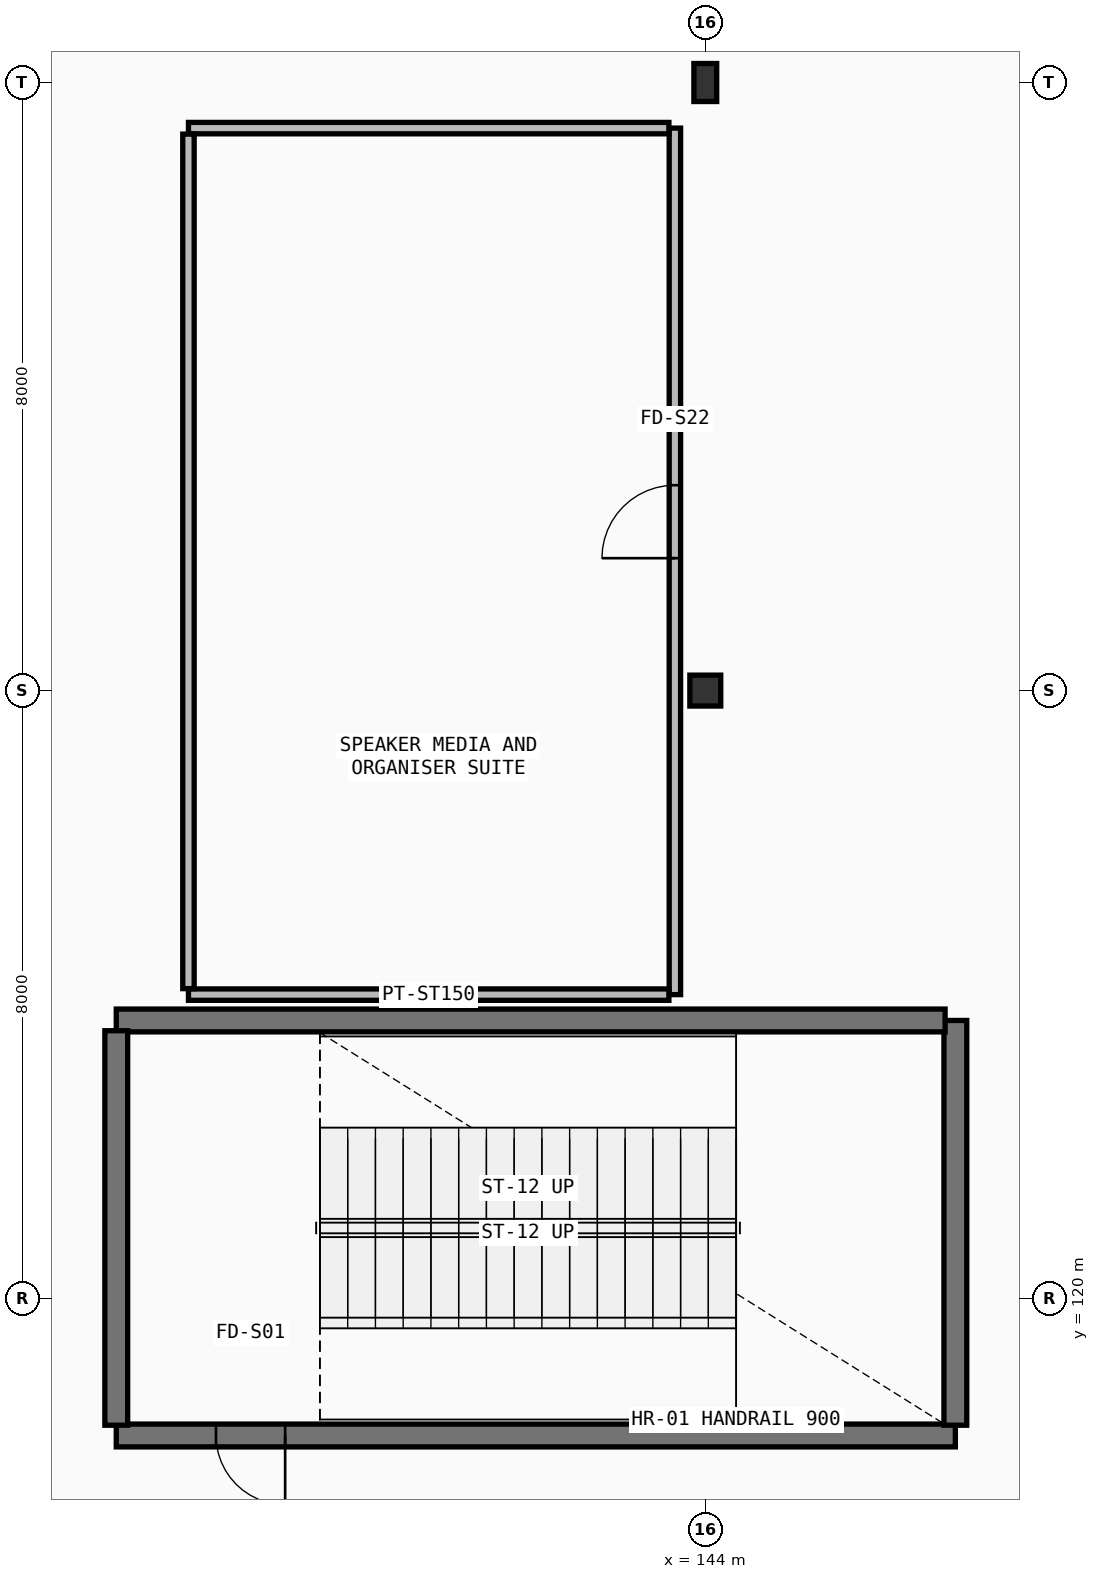
"""IFC4 building model, lengths in metres.
Left out: names, types, materials, properties, quantities, classifications, styles, units other than length and angle.
Written with IfcOpenShell. Run it as: python <this file> out.ifc"""

import sys

from ifc_helpers import new_model, si_unit, direction, frame, frame_2d, origin, origin_2d, place, context, subcontext, project, spatial, rectangle, hollow_circle, i_section, extrude, element, fill, save


model = new_model("IFC4")
c1 = context("Model", 3, precision=1e-05, world=origin(), true_north=direction((0.0, 1.0)))
c2 = subcontext(c1, "Body", "Model", "MODEL_VIEW")
j1 = project(units=[si_unit("LENGTHUNIT", "METRE"), si_unit("PLANEANGLEUNIT", "RADIAN")], contexts=[c1])
p1 = place(None, origin())
s1 = spatial("IfcSite", under=j1, at=p1, CompositionType="ELEMENT")
p2 = place(p1, origin())
s2 = spatial("IfcBuilding", under=s1, at=p2, CompositionType="ELEMENT")
p3 = place(p2, origin())
s3 = spatial("IfcBuildingStorey", under=s2, at=p3, CompositionType="ELEMENT", Elevation=0.0)
p4 = place(p3, frame((144.0, 128.0, -5.4), z_axis=(0.0, 0.0, 1.0), x_axis=(1.0, 0.0, 0.0)))
e1 = element("IfcColumn", 1, at=p4, inside=s3, PredefinedType="COLUMN", context=c2, shape_type="SweptSolid", body=[
    extrude(hollow_circle(Radius=0.203, WallThickness=0.02, at=origin_2d()), origin(), (0.0, 0.0, 1.0), 11.4),
])
p5 = place(p3, frame((144.0, 136.0, -5.4), z_axis=(0.0, 0.0, 1.0), x_axis=(1.0, 0.0, 0.0)))
e2 = element("IfcColumn", 2, at=p5, inside=s3, PredefinedType="COLUMN", context=c2, shape_type="SweptSolid", body=[
    extrude(i_section(OverallWidth=0.3, OverallDepth=0.5, WebThickness=0.014, FlangeThickness=0.028, FilletRadius=0.027, at=origin_2d()), origin(), (0.0, 0.0, 1.0), 11.4),
])
p6 = place(p3, frame((147.29, 118.2, 0.0), z_axis=(0.0, 0.0, 1.0), x_axis=(-1.0, 0.0, 0.0)))
e3 = element("IfcWall", 3, at=p6, inside=s3, PredefinedType="SHEAR", context=c2, shape_type="SweptSolid", body=[
    extrude(rectangle(XDim=11.04, YDim=0.3, at=frame_2d((5.52, 0.0))), origin(), (0.0, 0.0, 1.0), 5.64),
])
p7 = place(p6, frame((8.818, 0.0, 0.0)))
e4 = element("IfcOpeningElement", 4, at=p7, cuts=e3, PredefinedType="OPENING", context=c2, shape_type="SweptSolid", body=[
    extrude(rectangle(XDim=0.91, YDim=2.08, at=frame_2d((0.455, 1.04))), frame((0.0, 0.16, 0.0), z_axis=(0.0, -1.0, 0.0), x_axis=(1.0, 0.0, 0.0)), (0.0, 0.0, 1.0), 0.32),
])
p8 = place(p3, frame((147.29, 123.66, 0.0), z_axis=(0.0, 0.0, 1.0), x_axis=(0.0, -1.0, 0.0)))
e5 = element("IfcWall", 5, at=p8, inside=s3, PredefinedType="SHEAR", context=c2, shape_type="SweptSolid", body=[
    extrude(rectangle(XDim=5.325, YDim=0.3, at=frame_2d((2.663, 0.0))), origin(), (0.0, 0.0, 1.0), 5.64),
])
p9 = place(p3, frame((136.25, 123.66, 0.0), z_axis=(0.0, 0.0, 1.0), x_axis=(1.0, 0.0, 0.0)))
e6 = element("IfcWall", 6, at=p9, inside=s3, PredefinedType="SHEAR", context=c2, shape_type="SweptSolid", body=[
    extrude(rectangle(XDim=10.905, YDim=0.3, at=frame_2d((5.453, 0.0))), origin(), (0.0, 0.0, 1.0), 5.64),
])
p10 = place(p3, frame((136.25, 118.335, 0.0), z_axis=(0.0, 0.0, 1.0), x_axis=(0.0, 1.0, 0.0)))
e7 = element("IfcWall", 7, at=p10, inside=s3, PredefinedType="SHEAR", context=c2, shape_type="SweptSolid", body=[
    extrude(rectangle(XDim=5.19, YDim=0.3, at=frame_2d((2.595, 0.0))), origin(), (0.0, 0.0, 1.0), 5.64),
])
p11 = place(p3, frame((143.6, 124.0, 0.0), z_axis=(0.0, 0.0, 1.0), x_axis=(0.0, 1.0, 0.0)))
e8 = element("IfcWall", 8, at=p11, inside=s3, PredefinedType="PARTITIONING", context=c2, shape_type="SweptSolid", body=[
    extrude(rectangle(XDim=11.4, YDim=0.15, at=frame_2d((5.7, 0.0))), origin(), (0.0, 0.0, 1.0), 5.22),
])
p12 = place(p11, frame((5.742, 0.0, 0.0)))
e9 = element("IfcOpeningElement", 9, at=p12, cuts=e8, PredefinedType="OPENING", context=c2, shape_type="SweptSolid", body=[
    extrude(rectangle(XDim=0.96, YDim=2.45, at=frame_2d((0.48, 1.225))), frame((0.0, 0.085, 0.0), z_axis=(0.0, -1.0, 0.0), x_axis=(1.0, 0.0, 0.0)), (0.0, 0.0, 1.0), 0.17),
])
for number, where, z_axis, x_axis in (
    (10, (137.2, 124.0, 0.0), (0.0, 0.0, 1.0), (1.0, 0.0, 0.0)),
    (11, (143.521, 135.4, 0.0), (0.0, 0.0, 1.0), (-1.0, 0.0, 0.0)),
):
    element("IfcWall", number, at=place(p3, frame(where, z_axis=z_axis, x_axis=x_axis)), inside=s3, PredefinedType="PARTITIONING", context=c2, shape_type="SweptSolid", body=[
        extrude(rectangle(XDim=6.321, YDim=0.15, at=frame_2d((3.161, 0.0))), origin(), (0.0, 0.0, 1.0), 5.64),
    ])
p13 = place(p3, frame((137.2, 135.321, 0.0), z_axis=(0.0, 0.0, 1.0), x_axis=(0.0, -1.0, 0.0)))
e12 = element("IfcWall", 12, at=p13, inside=s3, PredefinedType="PARTITIONING", context=c2, shape_type="SweptSolid", body=[
    extrude(rectangle(XDim=11.242, YDim=0.15, at=frame_2d((5.621, 0.0))), origin(), (0.0, 0.0, 1.0), 5.22),
])
p14 = place(p7, origin())
e13 = element("IfcDoor", 13, at=p14, inside=s3, OperationType="SINGLE_SWING_LEFT", PredefinedType="DOOR", context=c2, shape_type="SweptSolid", body=[
    extrude(rectangle(XDim=0.91, YDim=2.08, at=frame_2d((0.455, 1.04))), frame((0.0, 0.025, 0.0), z_axis=(0.0, -1.0, 0.0), x_axis=(1.0, 0.0, 0.0)), (0.0, 0.0, 1.0), 0.05),
])
fill(e4, e13)
p15 = place(p12, origin())
e14 = element("IfcDoor", 14, at=p15, inside=s3, OperationType="SINGLE_SWING_RIGHT", PredefinedType="DOOR", context=c2, shape_type="SweptSolid", body=[
    extrude(rectangle(XDim=0.96, YDim=2.45, at=frame_2d((0.48, 1.225))), frame((0.0, 0.025, 0.0), z_axis=(0.0, -1.0, 0.0), x_axis=(1.0, 0.0, 0.0)), (0.0, 0.0, 1.0), 0.05),
])
fill(e9, e14)
save(model, sys.argv[1])
